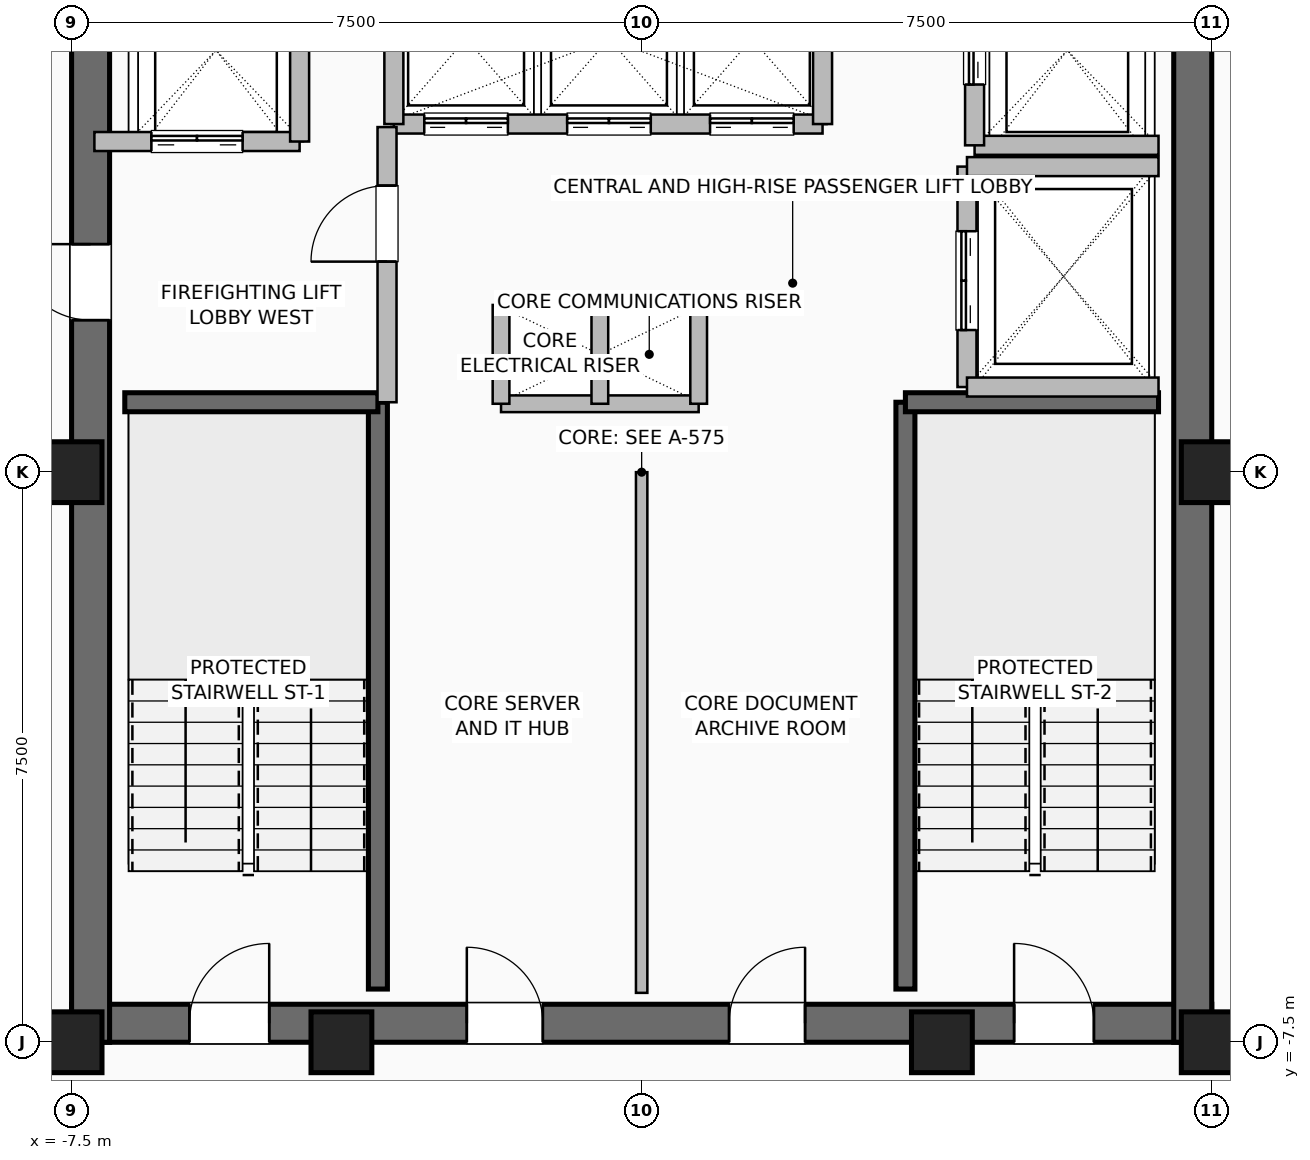
"""IFC4 building model, lengths in metres.
Left out: names, types, materials, properties, quantities, classifications, styles, units other than length and angle.
Written with IfcOpenShell. Run it as: python <this file> out.ifc"""

import sys

from ifc_helpers import new_model, si_unit, direction, frame, frame_2d, origin, origin_2d, place, context, subcontext, project, spatial, rectangle, hollow_rectangle, extrude, element, fill, save


model = new_model("IFC4")
c1 = context("Model", 3, precision=1e-05, world=origin(), true_north=direction((0.0, 1.0)))
c2 = subcontext(c1, "Body", "Model", "MODEL_VIEW")
j1 = project(units=[si_unit("LENGTHUNIT", "METRE"), si_unit("PLANEANGLEUNIT", "RADIAN")], contexts=[c1])
p1 = place(None, origin())
s1 = spatial("IfcSite", under=j1, at=p1, CompositionType="ELEMENT")
p2 = place(p1, origin())
s2 = spatial("IfcBuilding", under=s1, at=p2, CompositionType="ELEMENT")
p3 = place(p2, frame((0.0, 0.0, 297.2)))
s3 = spatial("IfcBuildingStorey", under=s2, at=p3, CompositionType="ELEMENT", Elevation=297.2)
for number, where, z_axis, x_axis in (
    (1, (-7.5, -7.5, 0.0), (0.0, 0.0, 1.0), (1.0, 0.0, 0.0)),
    (2, (-3.95, -7.5, 0.0), (0.0, 0.0, 1.0), (1.0, 0.0, 0.0)),
    (3, (3.95, -7.5, 0.0), (0.0, 0.0, 1.0), (1.0, 0.0, 0.0)),
    (4, (7.5, -7.5, 0.0), (0.0, 0.0, 1.0), (1.0, 0.0, 0.0)),
    (5, (7.5, 0.0, 0.0), (0.0, 0.0, 1.0), (1.0, 0.0, 0.0)),
    (6, (-7.5, 0.0, 0.0), (0.0, 0.0, 1.0), (1.0, 0.0, 0.0)),
):
    element("IfcColumn", number, at=place(p3, frame(where, z_axis=z_axis, x_axis=x_axis)), inside=s3, PredefinedType="COLUMN", context=c2, shape_type="SweptSolid", body=[
        extrude(hollow_rectangle(XDim=0.8, YDim=0.8, WallThickness=0.04, at=origin_2d()), origin(), (0.0, 0.0, 1.0), 3.6),
    ])
p4 = place(p3, frame((-7.5, -7.25, 0.0), z_axis=(0.0, 0.0, 1.0), x_axis=(1.0, 0.0, 0.0)))
e7 = element("IfcWall", 7, at=p4, inside=s3, PredefinedType="SHEAR", context=c2, shape_type="SweptSolid", body=[
    extrude(rectangle(XDim=15.0, YDim=0.5, at=frame_2d((7.5, 0.0))), origin(), (0.0, 0.0, 1.0), 3.2),
])
p5 = place(p4, frame((1.55, 0.0, 0.0)))
e8 = element("IfcOpeningElement", 8, at=p5, cuts=e7, PredefinedType="OPENING", context=c2, shape_type="SweptSolid", body=[
    extrude(rectangle(XDim=1.05, YDim=2.08, at=frame_2d((0.525, 1.04))), frame((0.0, 0.26, 0.0), z_axis=(0.0, -1.0, 0.0), x_axis=(1.0, 0.0, 0.0)), (0.0, 0.0, 1.0), 0.52),
])
p6 = place(p4, frame((12.4, 0.0, 0.0)))
e9 = element("IfcOpeningElement", 9, at=p6, cuts=e7, PredefinedType="OPENING", context=c2, shape_type="SweptSolid", body=[
    extrude(rectangle(XDim=1.05, YDim=2.08, at=frame_2d((0.525, 1.04))), frame((0.0, 0.26, 0.0), z_axis=(0.0, -1.0, 0.0), x_axis=(1.0, 0.0, 0.0)), (0.0, 0.0, 1.0), 0.52),
])
p7 = place(p4, frame((5.2, 0.0, 0.0)))
e10 = element("IfcOpeningElement", 10, at=p7, cuts=e7, PredefinedType="OPENING", context=c2, shape_type="SweptSolid", body=[
    extrude(rectangle(XDim=1.0, YDim=2.08, at=frame_2d((0.5, 1.04))), frame((0.0, 0.26, 0.0), z_axis=(0.0, -1.0, 0.0), x_axis=(1.0, 0.0, 0.0)), (0.0, 0.0, 1.0), 0.52),
])
p8 = place(p4, frame((8.65, 0.0, 0.0)))
e11 = element("IfcOpeningElement", 11, at=p8, cuts=e7, PredefinedType="OPENING", context=c2, shape_type="SweptSolid", body=[
    extrude(rectangle(XDim=1.0, YDim=2.08, at=frame_2d((0.5, 1.04))), frame((0.0, 0.26, 0.0), z_axis=(0.0, -1.0, 0.0), x_axis=(1.0, 0.0, 0.0)), (0.0, 0.0, 1.0), 0.52),
])
p9 = place(p3, frame((-7.25, -7.5, 0.0), z_axis=(0.0, 0.0, 1.0), x_axis=(0.0, 1.0, 0.0)))
e12 = element("IfcWall", 12, at=p9, inside=s3, PredefinedType="SHEAR", context=c2, shape_type="SweptSolid", body=[
    extrude(rectangle(XDim=15.0, YDim=0.5, at=frame_2d((7.5, 0.0))), origin(), (0.0, 0.0, 1.0), 3.2),
])
p10 = place(p9, frame((9.5, 0.0, 0.0)))
e13 = element("IfcOpeningElement", 13, at=p10, cuts=e12, PredefinedType="OPENING", context=c2, shape_type="SweptSolid", body=[
    extrude(rectangle(XDim=1.0, YDim=2.08, at=frame_2d((0.5, 1.04))), frame((0.0, 0.26, 0.0), z_axis=(0.0, -1.0, 0.0), x_axis=(1.0, 0.0, 0.0)), (0.0, 0.0, 1.0), 0.52),
])
p11 = place(p3, frame((7.25, -7.5, 0.0), z_axis=(0.0, 0.0, 1.0), x_axis=(0.0, 1.0, 0.0)))
e14 = element("IfcWall", 14, at=p11, inside=s3, PredefinedType="SHEAR", context=c2, shape_type="SweptSolid", body=[
    extrude(rectangle(XDim=15.0, YDim=0.5, at=frame_2d((7.5, 0.0))), origin(), (0.0, 0.0, 1.0), 3.2),
])
p12 = place(p3, frame((-3.47, -6.8, 0.0), z_axis=(0.0, 0.0, 1.0), x_axis=(0.0, 1.0, 0.0)))
e15 = element("IfcWall", 15, at=p12, inside=s3, PredefinedType="SHEAR", context=c2, shape_type="SweptSolid", body=[
    extrude(rectangle(XDim=7.72, YDim=0.25, at=frame_2d((3.86, 0.0))), origin(), (0.0, 0.0, 1.0), 3.2),
])
p13 = place(p3, frame((-6.8, 0.92, 0.0), z_axis=(0.0, 0.0, 1.0), x_axis=(1.0, 0.0, 0.0)))
e16 = element("IfcWall", 16, at=p13, inside=s3, PredefinedType="SHEAR", context=c2, shape_type="SweptSolid", body=[
    extrude(rectangle(XDim=3.33, YDim=0.25, at=frame_2d((1.665, 0.0))), origin(), (0.0, 0.0, 1.0), 3.2),
])
p14 = place(p3, frame((3.47, -6.8, 0.0), z_axis=(0.0, 0.0, 1.0), x_axis=(0.0, 1.0, 0.0)))
e17 = element("IfcWall", 17, at=p14, inside=s3, PredefinedType="SHEAR", context=c2, shape_type="SweptSolid", body=[
    extrude(rectangle(XDim=7.72, YDim=0.25, at=frame_2d((3.86, 0.0))), origin(), (0.0, 0.0, 1.0), 3.2),
])
p15 = place(p3, frame((3.47, 0.92, 0.0), z_axis=(0.0, 0.0, 1.0), x_axis=(1.0, 0.0, 0.0)))
e18 = element("IfcWall", 18, at=p15, inside=s3, PredefinedType="SHEAR", context=c2, shape_type="SweptSolid", body=[
    extrude(rectangle(XDim=3.33, YDim=0.25, at=frame_2d((1.665, 0.0))), origin(), (0.0, 0.0, 1.0), 3.2),
])
for number, where, z_axis, x_axis in (
    (19, (-1.85, 2.2, 0.0), (0.0, 0.0, 1.0), (1.0, 0.0, 0.0)),
    (20, (-1.85, 0.9, 0.0), (0.0, 0.0, 1.0), (1.0, 0.0, 0.0)),
):
    element("IfcWall", number, at=place(p3, frame(where, z_axis=z_axis, x_axis=x_axis)), inside=s3, PredefinedType="PARTITIONING", context=c2, shape_type="SweptSolid", body=[
        extrude(rectangle(XDim=2.6, YDim=0.22, at=frame_2d((1.3, 0.0))), origin(), (0.0, 0.0, 1.0), 3.2),
    ])
for number, where, z_axis, x_axis in (
    (21, (-0.55, 0.9, 0.0), (0.0, 0.0, 1.0), (0.0, 1.0, 0.0)),
    (22, (0.75, 0.9, 0.0), (0.0, 0.0, 1.0), (0.0, 1.0, 0.0)),
    (23, (-1.85, 0.9, 0.0), (0.0, 0.0, 1.0), (0.0, 1.0, 0.0)),
):
    element("IfcWall", number, at=place(p3, frame(where, z_axis=z_axis, x_axis=x_axis)), inside=s3, PredefinedType="PARTITIONING", context=c2, shape_type="SweptSolid", body=[
        extrude(rectangle(XDim=1.3, YDim=0.22, at=frame_2d((0.65, 0.0))), origin(), (0.0, 0.0, 1.0), 3.2),
    ])
p16 = place(p3, frame((-3.26, 4.58, 0.0), z_axis=(0.0, 0.0, 1.0), x_axis=(1.0, 0.0, 0.0)))
e24 = element("IfcWall", 24, at=p16, inside=s3, PredefinedType="SHEAR", context=c2, shape_type="SweptSolid", body=[
    extrude(rectangle(XDim=5.64, YDim=0.25, at=frame_2d((2.82, 0.0))), origin(), (0.0, 0.0, 1.0), 3.2),
])
p17 = place(p16, frame((0.4, 0.0, 0.0)))
e25 = element("IfcOpeningElement", 25, at=p17, cuts=e24, PredefinedType="OPENING", context=c2, shape_type="SweptSolid", body=[
    extrude(rectangle(XDim=1.1, YDim=2.2, at=frame_2d((0.55, 1.1))), frame((0.0, 0.135, 0.0), z_axis=(0.0, -1.0, 0.0), x_axis=(1.0, 0.0, 0.0)), (0.0, 0.0, 1.0), 0.27),
])
p18 = place(p16, frame((2.28, 0.0, 0.0)))
e26 = element("IfcOpeningElement", 26, at=p18, cuts=e24, PredefinedType="OPENING", context=c2, shape_type="SweptSolid", body=[
    extrude(rectangle(XDim=1.1, YDim=2.2, at=frame_2d((0.55, 1.1))), frame((0.0, 0.135, 0.0), z_axis=(0.0, -1.0, 0.0), x_axis=(1.0, 0.0, 0.0)), (0.0, 0.0, 1.0), 0.27),
])
p19 = place(p16, frame((4.16, 0.0, 0.0)))
e27 = element("IfcOpeningElement", 27, at=p19, cuts=e24, PredefinedType="OPENING", context=c2, shape_type="SweptSolid", body=[
    extrude(rectangle(XDim=1.1, YDim=2.2, at=frame_2d((0.55, 1.1))), frame((0.0, 0.135, 0.0), z_axis=(0.0, -1.0, 0.0), x_axis=(1.0, 0.0, 0.0)), (0.0, 0.0, 1.0), 0.27),
])
for number, where, z_axis, x_axis in (
    (28, (-3.26, 4.58, 0.0), (0.0, 0.0, 1.0), (0.0, 1.0, 0.0)),
    (29, (2.38, 4.58, 0.0), (0.0, 0.0, 1.0), (0.0, 1.0, 0.0)),
):
    element("IfcWall", number, at=place(p3, frame(where, z_axis=z_axis, x_axis=x_axis)), inside=s3, PredefinedType="SHEAR", context=c2, shape_type="SweptSolid", body=[
        extrude(rectangle(XDim=2.22, YDim=0.25, at=frame_2d((1.11, 0.0))), origin(), (0.0, 0.0, 1.0), 3.2),
    ])
p20 = place(p3, frame((-7.2, 4.35, 0.0), z_axis=(0.0, 0.0, 1.0), x_axis=(1.0, 0.0, 0.0)))
e30 = element("IfcWall", 30, at=p20, inside=s3, PredefinedType="SHEAR", context=c2, shape_type="SweptSolid", body=[
    extrude(rectangle(XDim=2.7, YDim=0.25, at=frame_2d((1.35, 0.0))), origin(), (0.0, 0.0, 1.0), 3.2),
])
p21 = place(p20, frame((0.75, 0.0, 0.0)))
e31 = element("IfcOpeningElement", 31, at=p21, cuts=e30, PredefinedType="OPENING", context=c2, shape_type="SweptSolid", body=[
    extrude(rectangle(XDim=1.2, YDim=2.2, at=frame_2d((0.6, 1.1))), frame((0.0, 0.135, 0.0), z_axis=(0.0, -1.0, 0.0), x_axis=(1.0, 0.0, 0.0)), (0.0, 0.0, 1.0), 0.27),
])
p22 = place(p3, frame((-4.5, 4.35, 0.0), z_axis=(0.0, 0.0, 1.0), x_axis=(0.0, 1.0, 0.0)))
e32 = element("IfcWall", 32, at=p22, inside=s3, PredefinedType="SHEAR", context=c2, shape_type="SweptSolid", body=[
    extrude(rectangle(XDim=2.85, YDim=0.25, at=frame_2d((1.425, 0.0))), origin(), (0.0, 0.0, 1.0), 3.2),
])
p23 = place(p3, frame((4.38, 4.3, 0.0), z_axis=(0.0, 0.0, 1.0), x_axis=(1.0, 0.0, 0.0)))
e33 = element("IfcWall", 33, at=p23, inside=s3, PredefinedType="SHEAR", context=c2, shape_type="SweptSolid", body=[
    extrude(rectangle(XDim=2.42, YDim=0.25, at=frame_2d((1.21, 0.0))), origin(), (0.0, 0.0, 1.0), 3.2),
])
p24 = place(p3, frame((4.38, 4.3, 0.0), z_axis=(0.0, 0.0, 1.0), x_axis=(0.0, 1.0, 0.0)))
e34 = element("IfcWall", 34, at=p24, inside=s3, PredefinedType="SHEAR", context=c2, shape_type="SweptSolid", body=[
    extrude(rectangle(XDim=2.5, YDim=0.25, at=frame_2d((1.25, 0.0))), origin(), (0.0, 0.0, 1.0), 3.2),
])
p25 = place(p24, frame((0.8, 0.0, 0.0)))
e35 = element("IfcOpeningElement", 35, at=p25, cuts=e34, PredefinedType="OPENING", context=c2, shape_type="SweptSolid", body=[
    extrude(rectangle(XDim=1.2, YDim=2.2, at=frame_2d((0.6, 1.1))), frame((0.0, 0.135, 0.0), z_axis=(0.0, -1.0, 0.0), x_axis=(1.0, 0.0, 0.0)), (0.0, 0.0, 1.0), 0.27),
])
p26 = place(p3, frame((4.28, 1.12, 0.0), z_axis=(0.0, 0.0, 1.0), x_axis=(0.0, 1.0, 0.0)))
e36 = element("IfcWall", 36, at=p26, inside=s3, PredefinedType="SHEAR", context=c2, shape_type="SweptSolid", body=[
    extrude(rectangle(XDim=2.9, YDim=0.25, at=frame_2d((1.45, 0.0))), origin(), (0.0, 0.0, 1.0), 3.2),
])
p27 = place(p26, frame((0.75, 0.0, 0.0)))
e37 = element("IfcOpeningElement", 37, at=p27, cuts=e36, PredefinedType="OPENING", context=c2, shape_type="SweptSolid", body=[
    extrude(rectangle(XDim=1.3, YDim=2.3, at=frame_2d((0.65, 1.15))), frame((0.0, 0.135, 0.0), z_axis=(0.0, -1.0, 0.0), x_axis=(1.0, 0.0, 0.0)), (0.0, 0.0, 1.0), 0.27),
])
for number, where, z_axis, x_axis in (
    (38, (4.28, 1.12, 0.0), (0.0, 0.0, 1.0), (1.0, 0.0, 0.0)),
    (39, (4.28, 4.02, 0.0), (0.0, 0.0, 1.0), (1.0, 0.0, 0.0)),
):
    element("IfcWall", number, at=place(p3, frame(where, z_axis=z_axis, x_axis=x_axis)), inside=s3, PredefinedType="SHEAR", context=c2, shape_type="SweptSolid", body=[
        extrude(rectangle(XDim=2.52, YDim=0.25, at=frame_2d((1.26, 0.0))), origin(), (0.0, 0.0, 1.0), 3.2),
    ])
p28 = place(p3, frame((-3.35, 0.92, 0.0), z_axis=(0.0, 0.0, 1.0), x_axis=(0.0, 1.0, 0.0)))
e40 = element("IfcWall", 40, at=p28, inside=s3, PredefinedType="SHEAR", context=c2, shape_type="SweptSolid", body=[
    extrude(rectangle(XDim=3.62, YDim=0.25, at=frame_2d((1.81, 0.0))), origin(), (0.0, 0.0, 1.0), 3.2),
])
p29 = place(p28, frame((1.85, 0.0, 0.0)))
e41 = element("IfcOpeningElement", 41, at=p29, cuts=e40, PredefinedType="OPENING", context=c2, shape_type="SweptSolid", body=[
    extrude(rectangle(XDim=1.0, YDim=2.08, at=frame_2d((0.5, 1.04))), frame((0.0, 0.135, 0.0), z_axis=(0.0, -1.0, 0.0), x_axis=(1.0, 0.0, 0.0)), (0.0, 0.0, 1.0), 0.27),
])
p30 = place(p3, frame((0.0, -6.85, 0.0), z_axis=(0.0, 0.0, 1.0), x_axis=(0.0, 1.0, 0.0)))
e42 = element("IfcWall", 42, at=p30, inside=s3, PredefinedType="PARTITIONING", context=c2, shape_type="SweptSolid", body=[
    extrude(rectangle(XDim=6.85, YDim=0.15, at=frame_2d((3.425, 0.0))), origin(), (0.0, 0.0, 1.0), 3.2),
])
p31 = place(p3, frame((7.45, -7.48, 0.0), z_axis=(0.0, 0.0, 1.0), x_axis=(1.0, 0.0, 0.0)))
e43 = element("IfcWall", 43, at=p31, inside=s3, PredefinedType="PARTITIONING", context=c2, shape_type="SweptSolid", body=[
    extrude(rectangle(XDim=0.95, YDim=0.15, at=frame_2d((0.475, 0.0))), origin(), (0.0, 0.0, 1.0), 2.075),
])
p32 = place(p5, origin())
e44 = element("IfcDoor", 44, at=p32, inside=s3, OperationType="SINGLE_SWING_RIGHT", PredefinedType="DOOR", context=c2, shape_type="SweptSolid", body=[
    extrude(rectangle(XDim=1.05, YDim=2.08, at=frame_2d((0.525, 1.04))), frame((0.0, 0.025, 0.0), z_axis=(0.0, -1.0, 0.0), x_axis=(1.0, 0.0, 0.0)), (0.0, 0.0, 1.0), 0.05),
])
fill(e8, e44)
p33 = place(p6, origin())
e45 = element("IfcDoor", 45, at=p33, inside=s3, OperationType="SINGLE_SWING_LEFT", PredefinedType="DOOR", context=c2, shape_type="SweptSolid", body=[
    extrude(rectangle(XDim=1.05, YDim=2.08, at=frame_2d((0.525, 1.04))), frame((0.0, 0.025, 0.0), z_axis=(0.0, -1.0, 0.0), x_axis=(1.0, 0.0, 0.0)), (0.0, 0.0, 1.0), 0.05),
])
fill(e9, e45)
p34 = place(p10, origin())
e46 = element("IfcDoor", 46, at=p34, inside=s3, OperationType="SINGLE_SWING_RIGHT", PredefinedType="DOOR", context=c2, shape_type="SweptSolid", body=[
    extrude(rectangle(XDim=1.0, YDim=2.08, at=frame_2d((0.5, 1.04))), frame((0.0, 0.025, 0.0), z_axis=(0.0, -1.0, 0.0), x_axis=(1.0, 0.0, 0.0)), (0.0, 0.0, 1.0), 0.05),
])
fill(e13, e46)
p35 = place(p7, origin())
e47 = element("IfcDoor", 47, at=p35, inside=s3, OperationType="SINGLE_SWING_LEFT", PredefinedType="DOOR", context=c2, shape_type="SweptSolid", body=[
    extrude(rectangle(XDim=1.0, YDim=2.08, at=frame_2d((0.5, 1.04))), frame((0.0, 0.025, 0.0), z_axis=(0.0, -1.0, 0.0), x_axis=(1.0, 0.0, 0.0)), (0.0, 0.0, 1.0), 0.05),
])
fill(e10, e47)
p36 = place(p8, origin())
e48 = element("IfcDoor", 48, at=p36, inside=s3, OperationType="SINGLE_SWING_RIGHT", PredefinedType="DOOR", context=c2, shape_type="SweptSolid", body=[
    extrude(rectangle(XDim=1.0, YDim=2.08, at=frame_2d((0.5, 1.04))), frame((0.0, 0.025, 0.0), z_axis=(0.0, -1.0, 0.0), x_axis=(1.0, 0.0, 0.0)), (0.0, 0.0, 1.0), 0.05),
])
fill(e11, e48)
p37 = place(p17, origin())
e49 = element("IfcDoor", 49, at=p37, inside=s3, OperationType="DOUBLE_DOOR_SLIDING", PredefinedType="DOOR", context=c2, shape_type="SweptSolid", body=[
    extrude(rectangle(XDim=1.1, YDim=2.2, at=frame_2d((0.55, 1.1))), frame((0.0, 0.025, 0.0), z_axis=(0.0, -1.0, 0.0), x_axis=(1.0, 0.0, 0.0)), (0.0, 0.0, 1.0), 0.05),
])
fill(e25, e49)
p38 = place(p18, origin())
e50 = element("IfcDoor", 50, at=p38, inside=s3, OperationType="DOUBLE_DOOR_SLIDING", PredefinedType="DOOR", context=c2, shape_type="SweptSolid", body=[
    extrude(rectangle(XDim=1.1, YDim=2.2, at=frame_2d((0.55, 1.1))), frame((0.0, 0.025, 0.0), z_axis=(0.0, -1.0, 0.0), x_axis=(1.0, 0.0, 0.0)), (0.0, 0.0, 1.0), 0.05),
])
fill(e26, e50)
p39 = place(p19, origin())
e51 = element("IfcDoor", 51, at=p39, inside=s3, OperationType="DOUBLE_DOOR_SLIDING", PredefinedType="DOOR", context=c2, shape_type="SweptSolid", body=[
    extrude(rectangle(XDim=1.1, YDim=2.2, at=frame_2d((0.55, 1.1))), frame((0.0, 0.025, 0.0), z_axis=(0.0, -1.0, 0.0), x_axis=(1.0, 0.0, 0.0)), (0.0, 0.0, 1.0), 0.05),
])
fill(e27, e51)
p40 = place(p21, origin())
e52 = element("IfcDoor", 52, at=p40, inside=s3, OperationType="DOUBLE_DOOR_SLIDING", PredefinedType="DOOR", context=c2, shape_type="SweptSolid", body=[
    extrude(rectangle(XDim=1.2, YDim=2.2, at=frame_2d((0.6, 1.1))), frame((0.0, 0.025, 0.0), z_axis=(0.0, -1.0, 0.0), x_axis=(1.0, 0.0, 0.0)), (0.0, 0.0, 1.0), 0.05),
])
fill(e31, e52)
p41 = place(p25, origin())
e53 = element("IfcDoor", 53, at=p41, inside=s3, OperationType="DOUBLE_DOOR_SLIDING", PredefinedType="DOOR", context=c2, shape_type="SweptSolid", body=[
    extrude(rectangle(XDim=1.2, YDim=2.2, at=frame_2d((0.6, 1.1))), frame((0.0, 0.025, 0.0), z_axis=(0.0, -1.0, 0.0), x_axis=(1.0, 0.0, 0.0)), (0.0, 0.0, 1.0), 0.05),
])
fill(e35, e53)
p42 = place(p27, origin())
e54 = element("IfcDoor", 54, at=p42, inside=s3, OperationType="DOUBLE_DOOR_SLIDING", PredefinedType="DOOR", context=c2, shape_type="SweptSolid", body=[
    extrude(rectangle(XDim=1.3, YDim=2.3, at=frame_2d((0.65, 1.15))), frame((0.0, 0.025, 0.0), z_axis=(0.0, -1.0, 0.0), x_axis=(1.0, 0.0, 0.0)), (0.0, 0.0, 1.0), 0.05),
])
fill(e37, e54)
p43 = place(p29, origin())
e55 = element("IfcDoor", 55, at=p43, inside=s3, OperationType="SINGLE_SWING_LEFT", PredefinedType="DOOR", context=c2, shape_type="SweptSolid", body=[
    extrude(rectangle(XDim=1.0, YDim=2.08, at=frame_2d((0.5, 1.04))), frame((0.0, 0.025, 0.0), z_axis=(0.0, -1.0, 0.0), x_axis=(1.0, 0.0, 0.0)), (0.0, 0.0, 1.0), 0.05),
])
fill(e41, e55)
save(model, sys.argv[1])
